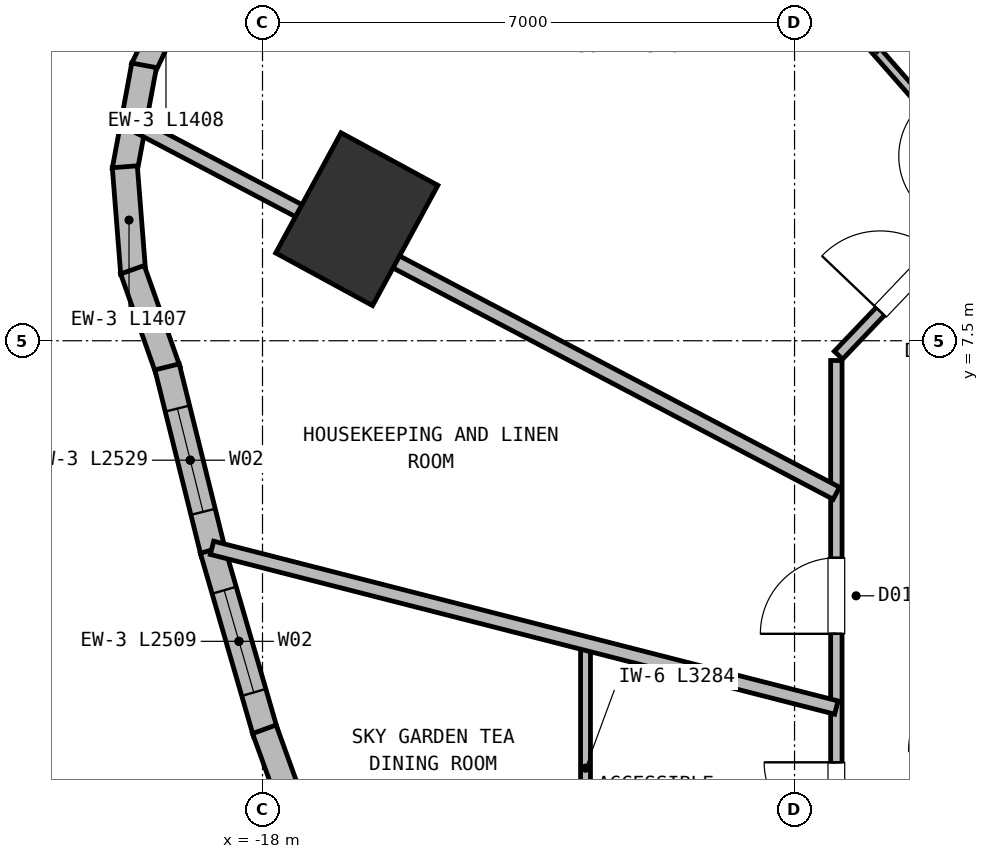
"""IFC4 building model, lengths in metres.
Left out: names, types, materials, properties, quantities, classifications, styles, units other than length and angle.
Written with IfcOpenShell. Run it as: python <this file> out.ifc"""

import sys

from ifc_helpers import new_model, si_unit, direction, frame, frame_2d, origin, origin_2d, place, context, subcontext, project, spatial, rectangle, extrude, element, fill, save


model = new_model("IFC4")
c1 = context("Model", 3, precision=1e-05, world=origin(), true_north=direction((0.0, 1.0)))
c2 = subcontext(c1, "Body", "Model", "MODEL_VIEW")
j1 = project(units=[si_unit("LENGTHUNIT", "METRE"), si_unit("PLANEANGLEUNIT", "RADIAN")], contexts=[c1])
p1 = place(None, origin())
s1 = spatial("IfcSite", under=j1, at=p1, CompositionType="ELEMENT")
p2 = place(p1, origin())
s2 = spatial("IfcBuilding", under=s1, at=p2, CompositionType="ELEMENT")
p3 = place(p2, frame((0.0, 0.0, 194.15)))
s3 = spatial("IfcBuildingStorey", under=s2, at=p3, CompositionType="ELEMENT", Elevation=194.15)
p4 = place(p3, frame((-16.76, 9.1, 0.0), z_axis=(0.0, 0.0, 1.0), x_axis=(-0.878817112662, 0.47715876026, 0.0)))
e1 = element("IfcColumn", 1, at=p4, inside=s3, PredefinedType="COLUMN", context=c2, shape_type="SweptSolid", body=[
    extrude(rectangle(XDim=1.45, YDim=1.8, at=origin_2d()), origin(), (0.0, 0.0, 1.0), 3.8),
])
for number, where, z_axis, x_axis in (
    (2, (-19.573, 11.076, 0.0), (0.0, 0.0, 1.0), (0.431, 0.902, 0.0)),
    (3, (-19.814, 9.74, 0.0), (0.0, 0.0, 1.0), (0.182, 0.983, 0.0)),
):
    element("IfcWall", number, at=place(p3, frame(where, z_axis=z_axis, x_axis=x_axis)), inside=s3, PredefinedType="SOLIDWALL", context=c2, shape_type="SweptSolid", body=[
        extrude(rectangle(XDim=1.407, YDim=0.33, at=frame_2d((0.704, 0.0))), origin(), (0.0, 0.0, 1.0), 3.55),
    ])
p5 = place(p3, frame((-19.701, 8.386, 0.0), z_axis=(0.0, 0.0, 1.0), x_axis=(-0.078566409812, 0.99690888212, 0.0)))
e4 = element("IfcWall", 4, at=p5, inside=s3, PredefinedType="SOLIDWALL", context=c2, shape_type="SweptSolid", body=[
    extrude(rectangle(XDim=1.408, YDim=0.33, at=frame_2d((0.704, 0.0))), origin(), (0.0, 0.0, 1.0), 3.55),
])
p6 = place(p3, frame((-19.241, 7.108, 0.0), z_axis=(0.0, 0.0, 1.0), x_axis=(-0.33376364871, 0.942656791627, 0.0)))
e5 = element("IfcWall", 5, at=p6, inside=s3, PredefinedType="SOLIDWALL", context=c2, shape_type="SweptSolid", body=[
    extrude(rectangle(XDim=1.407, YDim=0.33, at=frame_2d((0.704, 0.0))), origin(), (0.0, 0.0, 1.0), 3.55),
])
p7 = place(p3, frame((-18.646, 4.701, 0.0), z_axis=(0.0, 0.0, 1.0), x_axis=(-0.241149785718, 0.970487908656, 0.0)))
e6 = element("IfcWall", 6, at=p7, inside=s3, PredefinedType="SOLIDWALL", context=c2, shape_type="SweptSolid", body=[
    extrude(rectangle(XDim=2.529, YDim=0.33, at=frame_2d((1.265, 0.0))), origin(), (0.0, 0.0, 1.0), 3.55),
])
p8 = place(p7, frame((0.564, 0.0, 0.72)))
e7 = element("IfcOpeningElement", 7, at=p8, cuts=e6, PredefinedType="OPENING", context=c2, shape_type="SweptSolid", body=[
    extrude(rectangle(XDim=1.4, YDim=1.84, at=frame_2d((0.7, 0.92))), frame((0.0, 0.175, 0.0), z_axis=(0.0, -1.0, 0.0), x_axis=(1.0, 0.0, 0.0)), (0.0, 0.0, 1.0), 0.35),
])
p9 = place(p3, frame((-17.96, 2.34, 0.0), z_axis=(0.0, 0.0, 1.0), x_axis=(-0.278497522166, 0.960436947513, 0.0)))
e8 = element("IfcWall", 8, at=p9, inside=s3, PredefinedType="SOLIDWALL", context=c2, shape_type="SweptSolid", body=[
    extrude(rectangle(XDim=2.509, YDim=0.33, at=frame_2d((1.254, 0.0))), origin(), (0.0, 0.0, 1.0), 3.55),
])
p10 = place(p9, frame((0.554, 0.0, 0.72)))
e9 = element("IfcOpeningElement", 9, at=p10, cuts=e8, PredefinedType="OPENING", context=c2, shape_type="SweptSolid", body=[
    extrude(rectangle(XDim=1.4, YDim=1.84, at=frame_2d((0.7, 0.92))), frame((0.0, 0.175, 0.0), z_axis=(0.0, -1.0, 0.0), x_axis=(1.0, 0.0, 0.0)), (0.0, 0.0, 1.0), 0.35),
])
p11 = place(p3, frame((-16.052, -2.932, 0.0), z_axis=(0.0, 0.0, 1.0), x_axis=(-0.340145014301, 0.940372994745, 0.0)))
e10 = element("IfcWall", 10, at=p11, inside=s3, PredefinedType="SOLIDWALL", context=c2, shape_type="SweptSolid", body=[
    extrude(rectangle(XDim=5.657, YDim=0.33, at=frame_2d((2.828, 0.0))), origin(), (0.0, 0.0, 1.0), 3.55),
])
p12 = place(p11, frame((2.128, 0.0, 0.72)))
e11 = element("IfcOpeningElement", 11, at=p12, cuts=e10, PredefinedType="OPENING", context=c2, shape_type="SweptSolid", body=[
    extrude(rectangle(XDim=1.4, YDim=1.88, at=frame_2d((0.7, 0.94))), frame((0.0, 0.175, 0.0), z_axis=(0.0, -1.0, 0.0), x_axis=(1.0, 0.0, 0.0)), (0.0, 0.0, 1.0), 0.35),
])
p13 = place(p3, frame((-10.422, 7.309, 0.0), z_axis=(0.0, 0.0, 1.0), x_axis=(0.689960858356, 0.723846678473, 0.0)))
e12 = element("IfcWall", 12, at=p13, inside=s3, PredefinedType="PARTITIONING", context=c2, shape_type="SweptSolid", body=[
    extrude(rectangle(XDim=2.572, YDim=0.15, at=frame_2d((1.286, 0.0))), origin(), (0.0, 0.0, 1.0), 3.55),
])
p14 = place(p13, frame((0.796, 0.0, 0.0)))
e13 = element("IfcOpeningElement", 13, at=p14, cuts=e12, PredefinedType="OPENING", context=c2, shape_type="SweptSolid", body=[
    extrude(rectangle(XDim=1.06, YDim=2.15, at=frame_2d((0.53, 1.075))), frame((0.0, 0.085, 0.0), z_axis=(0.0, -1.0, 0.0), x_axis=(1.0, 0.0, 0.0)), (0.0, 0.0, 1.0), 0.17),
])
p15 = place(p3, frame((-10.45, -7.24, 0.0), z_axis=(0.0, 0.0, 1.0), x_axis=(0.0, 1.0, 0.0)))
e14 = element("IfcWall", 14, at=p15, inside=s3, PredefinedType="PARTITIONING", context=c2, shape_type="SweptSolid", body=[
    extrude(rectangle(XDim=14.48, YDim=0.15, at=frame_2d((7.24, 0.0))), origin(), (0.0, 0.0, 1.0), 3.23),
])
p16 = place(p15, frame((8.243, 0.0, 0.0)))
e15 = element("IfcOpeningElement", 15, at=p16, cuts=e14, PredefinedType="OPENING", context=c2, shape_type="SweptSolid", body=[
    extrude(rectangle(XDim=0.95, YDim=2.1, at=frame_2d((0.475, 1.05))), frame((0.0, 0.085, 0.0), z_axis=(0.0, -1.0, 0.0), x_axis=(1.0, 0.0, 0.0)), (0.0, 0.0, 1.0), 0.17),
])
p17 = place(p15, frame((10.884, 0.0, 0.0)))
e16 = element("IfcOpeningElement", 16, at=p17, cuts=e14, PredefinedType="OPENING", context=c2, shape_type="SweptSolid", body=[
    extrude(rectangle(XDim=1.0, YDim=2.15, at=frame_2d((0.5, 1.075))), frame((0.0, 0.085, 0.0), z_axis=(0.0, -1.0, 0.0), x_axis=(1.0, 0.0, 0.0)), (0.0, 0.0, 1.0), 0.17),
])
p18 = place(p15, frame((3.349, 0.0, 0.0)))
e17 = element("IfcOpeningElement", 17, at=p18, cuts=e14, PredefinedType="OPENING", context=c2, shape_type="SweptSolid", body=[
    extrude(rectangle(XDim=1.0, YDim=2.15, at=frame_2d((0.5, 1.075))), frame((0.0, 0.085, 0.0), z_axis=(0.0, -1.0, 0.0), x_axis=(1.0, 0.0, 0.0)), (0.0, 0.0, 1.0), 0.17),
])
p19 = place(p3, frame((-13.75, 0.233, 0.0), z_axis=(0.0, 0.0, 1.0), x_axis=(0.0, 1.0, 0.0)))
e18 = element("IfcWall", 18, at=p19, inside=s3, PredefinedType="PARTITIONING", context=c2, shape_type="SweptSolid", body=[
    extrude(rectangle(XDim=3.285, YDim=0.13, at=frame_2d((1.642, 0.0))), origin(), (0.0, 0.0, 1.0), 3.55),
])
p20 = place(p3, frame((-8.069, 9.2, 0.0), z_axis=(0.0, 0.0, 1.0), x_axis=(-0.659368411854, 0.751819990057, 0.0)))
e19 = element("IfcWall", 19, at=p20, inside=s3, PredefinedType="PARTITIONING", context=c2, shape_type="SweptSolid", body=[
    extrude(rectangle(XDim=2.86, YDim=0.12, at=frame_2d((1.43, 0.0))), origin(), (0.0, 0.0, 1.0), 3.55),
])
p21 = place(p20, frame((0.97, 0.0, 0.0)))
e20 = element("IfcOpeningElement", 20, at=p21, cuts=e19, PredefinedType="OPENING", context=c2, shape_type="SweptSolid", body=[
    extrude(rectangle(XDim=0.92, YDim=2.1, at=frame_2d((0.46, 1.05))), frame((0.0, 0.07, 0.0), z_axis=(0.0, -1.0, 0.0), x_axis=(1.0, 0.0, 0.0)), (0.0, 0.0, 1.0), 0.14),
])
p22 = place(p3, frame((-10.45, 5.493, 0.0), z_axis=(0.0, 0.0, 1.0), x_axis=(-0.885159330624, 0.465288039187, 0.0)))
e21 = element("IfcWall", 21, at=p22, inside=s3, PredefinedType="PARTITIONING", context=c2, shape_type="SweptSolid", body=[
    extrude(rectangle(XDim=10.45, YDim=0.18, at=frame_2d((5.225, 0.0))), origin(), (0.0, 0.0, 1.0), 3.55),
])
p23 = place(p3, frame((-10.45, 2.674, 0.0), z_axis=(0.0, 0.0, 1.0), x_axis=(-0.968789680245, 0.247884157321, 0.0)))
e22 = element("IfcWall", 22, at=p23, inside=s3, PredefinedType="PARTITIONING", context=c2, shape_type="SweptSolid", body=[
    extrude(rectangle(XDim=8.479, YDim=0.18, at=frame_2d((4.24, 0.0))), origin(), (0.0, 0.0, 1.0), 3.55),
])
p24 = place(p8, origin())
e23 = element("IfcWindow", 23, at=p24, inside=s3, PartitioningType="SINGLE_PANEL", PredefinedType="WINDOW", context=c2, shape_type="SweptSolid", body=[
    extrude(rectangle(XDim=1.4, YDim=1.84, at=frame_2d((0.7, 0.92))), frame((0.0, 0.03, 0.0), z_axis=(0.0, -1.0, 0.0), x_axis=(1.0, 0.0, 0.0)), (0.0, 0.0, 1.0), 0.06),
])
fill(e7, e23)
p25 = place(p10, origin())
e24 = element("IfcWindow", 24, at=p25, inside=s3, PartitioningType="SINGLE_PANEL", PredefinedType="WINDOW", context=c2, shape_type="SweptSolid", body=[
    extrude(rectangle(XDim=1.4, YDim=1.84, at=frame_2d((0.7, 0.92))), frame((0.0, 0.03, 0.0), z_axis=(0.0, -1.0, 0.0), x_axis=(1.0, 0.0, 0.0)), (0.0, 0.0, 1.0), 0.06),
])
fill(e9, e24)
p26 = place(p16, origin())
e25 = element("IfcDoor", 25, at=p26, inside=s3, OperationType="SINGLE_SWING_RIGHT", PredefinedType="DOOR", context=c2, shape_type="SweptSolid", body=[
    extrude(rectangle(XDim=0.95, YDim=2.1, at=frame_2d((0.475, 1.05))), frame((0.0, 0.025, 0.0), z_axis=(0.0, -1.0, 0.0), x_axis=(1.0, 0.0, 0.0)), (0.0, 0.0, 1.0), 0.05),
])
fill(e15, e25)
p27 = place(p17, origin())
e26 = element("IfcDoor", 26, at=p27, inside=s3, OperationType="SINGLE_SWING_LEFT", PredefinedType="DOOR", context=c2, shape_type="SweptSolid", body=[
    extrude(rectangle(XDim=1.0, YDim=2.15, at=frame_2d((0.5, 1.075))), frame((0.0, 0.025, 0.0), z_axis=(0.0, -1.0, 0.0), x_axis=(1.0, 0.0, 0.0)), (0.0, 0.0, 1.0), 0.05),
])
fill(e16, e26)
p28 = place(p14, origin())
e27 = element("IfcDoor", 27, at=p28, inside=s3, OperationType="SINGLE_SWING_LEFT", PredefinedType="DOOR", context=c2, shape_type="SweptSolid", body=[
    extrude(rectangle(XDim=1.06, YDim=2.15, at=frame_2d((0.53, 1.075))), frame((0.0, 0.025, 0.0), z_axis=(0.0, -1.0, 0.0), x_axis=(1.0, 0.0, 0.0)), (0.0, 0.0, 1.0), 0.05),
])
fill(e13, e27)
save(model, sys.argv[1])
